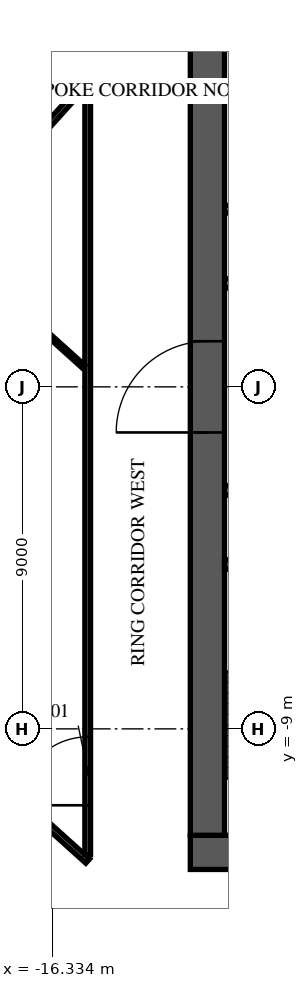
"""IFC4 building model, lengths in metres.
Left out: names, types, materials, properties, quantities, classifications, styles, units other than length and angle.
Written with IfcOpenShell. Run it as: python <this file> out.ifc"""

import sys

from ifc_helpers import new_model, si_unit, direction, frame, frame_2d, origin, place, context, subcontext, project, spatial, rectangle, extrude, element, fill, save


model = new_model("IFC4")
c1 = context("Model", 3, precision=1e-05, world=origin(), true_north=direction((0.0, 1.0)))
c2 = subcontext(c1, "Body", "Model", "MODEL_VIEW")
j1 = project(units=[si_unit("LENGTHUNIT", "METRE"), si_unit("PLANEANGLEUNIT", "RADIAN")], contexts=[c1])
p1 = place(None, origin())
s1 = spatial("IfcSite", under=j1, at=p1, CompositionType="ELEMENT")
p2 = place(p1, origin())
s2 = spatial("IfcBuilding", under=s1, at=p2, CompositionType="ELEMENT")
p3 = place(p2, frame((0.0, 0.0, 217.3)))
s3 = spatial("IfcBuildingStorey", under=s2, at=p3, CompositionType="ELEMENT", Elevation=217.3)
p4 = place(p3, frame((-12.7, -12.25, 0.0), z_axis=(0.0, 0.0, 1.0), x_axis=(1.0, 0.0, 0.0)))
e1 = element("IfcWall", 1, at=p4, inside=s3, PredefinedType="SHEAR", context=c2, shape_type="SweptSolid", body=[
    extrude(rectangle(XDim=25.4, YDim=0.9, at=frame_2d((12.7, 0.0))), origin(), (0.0, 0.0, 1.0), 3.62),
])
p5 = place(p4, frame((7.6, 0.0, 0.0)))
e2 = element("IfcOpeningElement", 2, at=p5, cuts=e1, PredefinedType="OPENING", context=c2, shape_type="SweptSolid", body=[
    extrude(rectangle(XDim=2.0, YDim=2.1, at=frame_2d((1.0, 1.05))), frame((0.0, 0.46, 0.0), z_axis=(0.0, -1.0, 0.0), x_axis=(1.0, 0.0, 0.0)), (0.0, 0.0, 1.0), 0.92),
])
p6 = place(p4, frame((17.725, 0.0, 0.0)))
e3 = element("IfcOpeningElement", 3, at=p6, cuts=e1, PredefinedType="OPENING", context=c2, shape_type="SweptSolid", body=[
    extrude(rectangle(XDim=1.2, YDim=2.1, at=frame_2d((0.6, 1.05))), frame((0.0, 0.46, 0.0), z_axis=(0.0, -1.0, 0.0), x_axis=(1.0, 0.0, 0.0)), (0.0, 0.0, 1.0), 0.92),
])
p7 = place(p4, frame((1.875, 0.0, 0.0)))
e4 = element("IfcOpeningElement", 4, at=p7, cuts=e1, PredefinedType="OPENING", context=c2, shape_type="SweptSolid", body=[
    extrude(rectangle(XDim=1.2, YDim=2.1, at=frame_2d((0.6, 1.05))), frame((0.0, 0.46, 0.0), z_axis=(0.0, -1.0, 0.0), x_axis=(1.0, 0.0, 0.0)), (0.0, 0.0, 1.0), 0.92),
])
p8 = place(p4, frame((22.325, 0.0, 0.0)))
e5 = element("IfcOpeningElement", 5, at=p8, cuts=e1, PredefinedType="OPENING", context=c2, shape_type="SweptSolid", body=[
    extrude(rectangle(XDim=1.2, YDim=2.1, at=frame_2d((0.6, 1.05))), frame((0.0, 0.46, 0.0), z_axis=(0.0, -1.0, 0.0), x_axis=(1.0, 0.0, 0.0)), (0.0, 0.0, 1.0), 0.92),
])
p9 = place(p3, frame((-12.25, -11.8, 0.0), z_axis=(0.0, 0.0, 1.0), x_axis=(0.0, 1.0, 0.0)))
e6 = element("IfcWall", 6, at=p9, inside=s3, PredefinedType="SHEAR", context=c2, shape_type="SweptSolid", body=[
    extrude(rectangle(XDim=23.6, YDim=0.9, at=frame_2d((11.8, 0.0))), origin(), (0.0, 0.0, 1.0), 3.62),
])
p10 = place(p9, frame((10.6, 0.0, 0.0)))
e7 = element("IfcOpeningElement", 7, at=p10, cuts=e6, PredefinedType="OPENING", context=c2, shape_type="SweptSolid", body=[
    extrude(rectangle(XDim=2.4, YDim=2.4, at=frame_2d((1.2, 1.2))), frame((0.0, 0.46, 0.0), z_axis=(0.0, -1.0, 0.0), x_axis=(1.0, 0.0, 0.0)), (0.0, 0.0, 1.0), 0.92),
])
p11 = place(p3, frame((-8.65, -4.675, 0.0), z_axis=(0.0, 0.0, 1.0), x_axis=(-1.0, 0.0, 0.0)))
e8 = element("IfcWall", 8, at=p11, inside=s3, PredefinedType="SOLIDWALL", context=c2, shape_type="SweptSolid", body=[
    extrude(rectangle(XDim=3.15, YDim=0.25, at=frame_2d((1.575, 0.0))), origin(), (0.0, 0.0, 1.0), 3.62),
])
p12 = place(p3, frame((-11.795, -2.725, 0.0), z_axis=(0.0, 0.0, 1.0), x_axis=(1.0, 0.0, 0.0)))
e9 = element("IfcWall", 9, at=p12, inside=s3, PredefinedType="PARTITIONING", context=c2, shape_type="SweptSolid", body=[
    extrude(rectangle(XDim=8.915, YDim=0.25, at=frame_2d((4.458, 0.0))), origin(), (0.0, 0.0, 1.0), 3.62),
])
p13 = place(p12, frame((1.295, 0.0, 0.0)))
e10 = element("IfcOpeningElement", 10, at=p13, cuts=e9, PredefinedType="OPENING", context=c2, shape_type="SweptSolid", body=[
    extrude(rectangle(XDim=1.0, YDim=2.1, at=frame_2d((0.5, 1.05))), frame((0.0, 0.135, 0.0), z_axis=(0.0, -1.0, 0.0), x_axis=(1.0, 0.0, 0.0)), (0.0, 0.0, 1.0), 0.27),
])
p14 = place(p12, frame((4.42, 0.0, 0.0)))
e11 = element("IfcOpeningElement", 11, at=p14, cuts=e9, PredefinedType="OPENING", context=c2, shape_type="SweptSolid", body=[
    extrude(rectangle(XDim=1.0, YDim=2.1, at=frame_2d((0.5, 1.05))), frame((0.0, 0.135, 0.0), z_axis=(0.0, -1.0, 0.0), x_axis=(1.0, 0.0, 0.0)), (0.0, 0.0, 1.0), 0.27),
])
p15 = place(p3, frame((-11.795, 2.725, 0.0), z_axis=(0.0, 0.0, 1.0), x_axis=(1.0, 0.0, 0.0)))
e12 = element("IfcWall", 12, at=p15, inside=s3, PredefinedType="PARTITIONING", context=c2, shape_type="SweptSolid", body=[
    extrude(rectangle(XDim=3.415, YDim=0.25, at=frame_2d((1.708, 0.0))), origin(), (0.0, 0.0, 1.0), 3.62),
])
p16 = place(p15, frame((1.345, 0.0, 0.0)))
e13 = element("IfcOpeningElement", 13, at=p16, cuts=e12, PredefinedType="OPENING", context=c2, shape_type="SweptSolid", body=[
    extrude(rectangle(XDim=0.9, YDim=2.1, at=frame_2d((0.45, 1.05))), frame((0.0, 0.135, 0.0), z_axis=(0.0, -1.0, 0.0), x_axis=(1.0, 0.0, 0.0)), (0.0, 0.0, 1.0), 0.27),
])
p17 = place(p3, frame((-11.795, 4.675, 0.0), z_axis=(0.0, 0.0, 1.0), x_axis=(1.0, 0.0, 0.0)))
e14 = element("IfcWall", 14, at=p17, inside=s3, PredefinedType="PARTITIONING", context=c2, shape_type="SweptSolid", body=[
    extrude(rectangle(XDim=3.415, YDim=0.2, at=frame_2d((1.708, 0.0))), origin(), (0.0, 0.0, 1.0), 3.62),
])
p18 = place(p3, frame((-1.962, 34.735, 0.0), z_axis=(0.0, 0.0, 1.0), x_axis=(-0.669133181838, -0.743142506497, 0.0)))
e15 = element("IfcWall", 15, at=p18, inside=s3, PredefinedType="STANDARD", context=c2, shape_type="SweptSolid", body=[
    extrude(rectangle(XDim=49.0, YDim=0.6, at=frame_2d((24.5, 0.0))), origin(), (0.0, 0.0, 1.0), 3.62),
])
p19 = place(p18, frame((1.227, 0.0, 0.9)))
e16 = element("IfcOpeningElement", 16, at=p19, cuts=e15, PredefinedType="OPENING", context=c2, shape_type="SweptSolid", body=[
    extrude(rectangle(XDim=2.0, YDim=2.1, at=frame_2d((1.0, 1.05))), frame((0.0, 0.31, 0.0), z_axis=(0.0, -1.0, 0.0), x_axis=(1.0, 0.0, 0.0)), (0.0, 0.0, 1.0), 0.62),
])
p20 = place(p18, frame((5.682, 0.0, 0.9)))
e17 = element("IfcOpeningElement", 17, at=p20, cuts=e15, PredefinedType="OPENING", context=c2, shape_type="SweptSolid", body=[
    extrude(rectangle(XDim=2.0, YDim=2.1, at=frame_2d((1.0, 1.05))), frame((0.0, 0.31, 0.0), z_axis=(0.0, -1.0, 0.0), x_axis=(1.0, 0.0, 0.0)), (0.0, 0.0, 1.0), 0.62),
])
p21 = place(p18, frame((10.136, 0.0, 0.9)))
e18 = element("IfcOpeningElement", 18, at=p21, cuts=e15, PredefinedType="OPENING", context=c2, shape_type="SweptSolid", body=[
    extrude(rectangle(XDim=2.0, YDim=2.1, at=frame_2d((1.0, 1.05))), frame((0.0, 0.31, 0.0), z_axis=(0.0, -1.0, 0.0), x_axis=(1.0, 0.0, 0.0)), (0.0, 0.0, 1.0), 0.62),
])
p22 = place(p18, frame((14.591, 0.0, 0.9)))
e19 = element("IfcOpeningElement", 19, at=p22, cuts=e15, PredefinedType="OPENING", context=c2, shape_type="SweptSolid", body=[
    extrude(rectangle(XDim=2.0, YDim=2.1, at=frame_2d((1.0, 1.05))), frame((0.0, 0.31, 0.0), z_axis=(0.0, -1.0, 0.0), x_axis=(1.0, 0.0, 0.0)), (0.0, 0.0, 1.0), 0.62),
])
p23 = place(p18, frame((19.045, 0.0, 0.9)))
e20 = element("IfcOpeningElement", 20, at=p23, cuts=e15, PredefinedType="OPENING", context=c2, shape_type="SweptSolid", body=[
    extrude(rectangle(XDim=2.0, YDim=2.1, at=frame_2d((1.0, 1.05))), frame((0.0, 0.31, 0.0), z_axis=(0.0, -1.0, 0.0), x_axis=(1.0, 0.0, 0.0)), (0.0, 0.0, 1.0), 0.62),
])
p24 = place(p18, frame((23.5, 0.0, 0.9)))
e21 = element("IfcOpeningElement", 21, at=p24, cuts=e15, PredefinedType="OPENING", context=c2, shape_type="SweptSolid", body=[
    extrude(rectangle(XDim=2.0, YDim=2.1, at=frame_2d((1.0, 1.05))), frame((0.0, 0.31, 0.0), z_axis=(0.0, -1.0, 0.0), x_axis=(1.0, 0.0, 0.0)), (0.0, 0.0, 1.0), 0.62),
])
p25 = place(p18, frame((27.955, 0.0, 0.9)))
e22 = element("IfcOpeningElement", 22, at=p25, cuts=e15, PredefinedType="OPENING", context=c2, shape_type="SweptSolid", body=[
    extrude(rectangle(XDim=2.0, YDim=2.1, at=frame_2d((1.0, 1.05))), frame((0.0, 0.31, 0.0), z_axis=(0.0, -1.0, 0.0), x_axis=(1.0, 0.0, 0.0)), (0.0, 0.0, 1.0), 0.62),
])
p26 = place(p18, frame((32.409, 0.0, 0.9)))
e23 = element("IfcOpeningElement", 23, at=p26, cuts=e15, PredefinedType="OPENING", context=c2, shape_type="SweptSolid", body=[
    extrude(rectangle(XDim=2.0, YDim=2.1, at=frame_2d((1.0, 1.05))), frame((0.0, 0.31, 0.0), z_axis=(0.0, -1.0, 0.0), x_axis=(1.0, 0.0, 0.0)), (0.0, 0.0, 1.0), 0.62),
])
p27 = place(p18, frame((36.864, 0.0, 0.9)))
e24 = element("IfcOpeningElement", 24, at=p27, cuts=e15, PredefinedType="OPENING", context=c2, shape_type="SweptSolid", body=[
    extrude(rectangle(XDim=2.0, YDim=2.1, at=frame_2d((1.0, 1.05))), frame((0.0, 0.31, 0.0), z_axis=(0.0, -1.0, 0.0), x_axis=(1.0, 0.0, 0.0)), (0.0, 0.0, 1.0), 0.62),
])
p28 = place(p18, frame((41.318, 0.0, 0.9)))
e25 = element("IfcOpeningElement", 25, at=p28, cuts=e15, PredefinedType="OPENING", context=c2, shape_type="SweptSolid", body=[
    extrude(rectangle(XDim=2.0, YDim=2.1, at=frame_2d((1.0, 1.05))), frame((0.0, 0.31, 0.0), z_axis=(0.0, -1.0, 0.0), x_axis=(1.0, 0.0, 0.0)), (0.0, 0.0, 1.0), 0.62),
])
p29 = place(p18, frame((45.773, 0.0, 0.9)))
e26 = element("IfcOpeningElement", 26, at=p29, cuts=e15, PredefinedType="OPENING", context=c2, shape_type="SweptSolid", body=[
    extrude(rectangle(XDim=2.0, YDim=2.1, at=frame_2d((1.0, 1.05))), frame((0.0, 0.31, 0.0), z_axis=(0.0, -1.0, 0.0), x_axis=(1.0, 0.0, 0.0)), (0.0, 0.0, 1.0), 0.62),
])
p30 = place(p3, frame((-34.365, -9.023, 0.0), z_axis=(0.0, 0.0, 1.0), x_axis=(0.743146896498, -0.66912830625, 0.0)))
e27 = element("IfcWall", 27, at=p30, inside=s3, PredefinedType="STANDARD", context=c2, shape_type="SweptSolid", body=[
    extrude(rectangle(XDim=39.0, YDim=0.6, at=frame_2d((19.5, 0.0))), origin(), (0.0, 0.0, 1.0), 3.62),
])
p31 = place(p30, frame((1.217, 0.0, 0.9)))
e28 = element("IfcOpeningElement", 28, at=p31, cuts=e27, PredefinedType="OPENING", context=c2, shape_type="SweptSolid", body=[
    extrude(rectangle(XDim=1.9, YDim=2.1, at=frame_2d((0.95, 1.05))), frame((0.0, 0.31, 0.0), z_axis=(0.0, -1.0, 0.0), x_axis=(1.0, 0.0, 0.0)), (0.0, 0.0, 1.0), 0.62),
])
p32 = place(p30, frame((5.55, 0.0, 0.9)))
e29 = element("IfcOpeningElement", 29, at=p32, cuts=e27, PredefinedType="OPENING", context=c2, shape_type="SweptSolid", body=[
    extrude(rectangle(XDim=1.9, YDim=2.1, at=frame_2d((0.95, 1.05))), frame((0.0, 0.31, 0.0), z_axis=(0.0, -1.0, 0.0), x_axis=(1.0, 0.0, 0.0)), (0.0, 0.0, 1.0), 0.62),
])
p33 = place(p30, frame((9.883, 0.0, 0.9)))
e30 = element("IfcOpeningElement", 30, at=p33, cuts=e27, PredefinedType="OPENING", context=c2, shape_type="SweptSolid", body=[
    extrude(rectangle(XDim=1.9, YDim=2.1, at=frame_2d((0.95, 1.05))), frame((0.0, 0.31, 0.0), z_axis=(0.0, -1.0, 0.0), x_axis=(1.0, 0.0, 0.0)), (0.0, 0.0, 1.0), 0.62),
])
p34 = place(p30, frame((14.217, 0.0, 0.9)))
e31 = element("IfcOpeningElement", 31, at=p34, cuts=e27, PredefinedType="OPENING", context=c2, shape_type="SweptSolid", body=[
    extrude(rectangle(XDim=1.9, YDim=2.1, at=frame_2d((0.95, 1.05))), frame((0.0, 0.31, 0.0), z_axis=(0.0, -1.0, 0.0), x_axis=(1.0, 0.0, 0.0)), (0.0, 0.0, 1.0), 0.62),
])
p35 = place(p30, frame((18.55, 0.0, 0.9)))
e32 = element("IfcOpeningElement", 32, at=p35, cuts=e27, PredefinedType="OPENING", context=c2, shape_type="SweptSolid", body=[
    extrude(rectangle(XDim=1.9, YDim=2.1, at=frame_2d((0.95, 1.05))), frame((0.0, 0.31, 0.0), z_axis=(0.0, -1.0, 0.0), x_axis=(1.0, 0.0, 0.0)), (0.0, 0.0, 1.0), 0.62),
])
p36 = place(p30, frame((22.883, 0.0, 0.9)))
e33 = element("IfcOpeningElement", 33, at=p36, cuts=e27, PredefinedType="OPENING", context=c2, shape_type="SweptSolid", body=[
    extrude(rectangle(XDim=1.9, YDim=2.1, at=frame_2d((0.95, 1.05))), frame((0.0, 0.31, 0.0), z_axis=(0.0, -1.0, 0.0), x_axis=(1.0, 0.0, 0.0)), (0.0, 0.0, 1.0), 0.62),
])
p37 = place(p30, frame((27.217, 0.0, 0.9)))
e34 = element("IfcOpeningElement", 34, at=p37, cuts=e27, PredefinedType="OPENING", context=c2, shape_type="SweptSolid", body=[
    extrude(rectangle(XDim=1.9, YDim=2.1, at=frame_2d((0.95, 1.05))), frame((0.0, 0.31, 0.0), z_axis=(0.0, -1.0, 0.0), x_axis=(1.0, 0.0, 0.0)), (0.0, 0.0, 1.0), 0.62),
])
p38 = place(p30, frame((31.55, 0.0, 0.9)))
e35 = element("IfcOpeningElement", 35, at=p38, cuts=e27, PredefinedType="OPENING", context=c2, shape_type="SweptSolid", body=[
    extrude(rectangle(XDim=1.9, YDim=2.1, at=frame_2d((0.95, 1.05))), frame((0.0, 0.31, 0.0), z_axis=(0.0, -1.0, 0.0), x_axis=(1.0, 0.0, 0.0)), (0.0, 0.0, 1.0), 0.62),
])
p39 = place(p30, frame((35.883, 0.0, 0.9)))
e36 = element("IfcOpeningElement", 36, at=p39, cuts=e27, PredefinedType="OPENING", context=c2, shape_type="SweptSolid", body=[
    extrude(rectangle(XDim=1.9, YDim=2.1, at=frame_2d((0.95, 1.05))), frame((0.0, 0.31, 0.0), z_axis=(0.0, -1.0, 0.0), x_axis=(1.0, 0.0, 0.0)), (0.0, 0.0, 1.0), 0.62),
])
p40 = place(p3, frame((-24.952, 1.024, 0.0), z_axis=(0.0, 0.0, 1.0), x_axis=(0.66912723064, 0.743147864974, 0.0)))
e37 = element("IfcWall", 37, at=p40, inside=s3, PredefinedType="PARTITIONING", context=c2, shape_type="SweptSolid", body=[
    extrude(rectangle(XDim=31.871, YDim=0.15, at=frame_2d((15.936, 0.0))), origin(), (0.0, 0.0, 1.0), 3.17),
])
p41 = place(p40, frame((16.202, 0.0, 0.0)))
e38 = element("IfcOpeningElement", 38, at=p41, cuts=e37, PredefinedType="OPENING", context=c2, shape_type="SweptSolid", body=[
    extrude(rectangle(XDim=1.0, YDim=2.1, at=frame_2d((0.5, 1.05))), frame((0.0, 0.085, 0.0), z_axis=(0.0, -1.0, 0.0), x_axis=(1.0, 0.0, 0.0)), (0.0, 0.0, 1.0), 0.17),
])
p42 = place(p40, frame((28.08, 0.0, 0.0)))
e39 = element("IfcOpeningElement", 39, at=p42, cuts=e37, PredefinedType="OPENING", context=c2, shape_type="SweptSolid", body=[
    extrude(rectangle(XDim=1.8, YDim=2.1, at=frame_2d((0.9, 1.05))), frame((0.0, 0.085, 0.0), z_axis=(0.0, -1.0, 0.0), x_axis=(1.0, 0.0, 0.0)), (0.0, 0.0, 1.0), 0.17),
])
p43 = place(p40, frame((22.58, 0.0, 0.0)))
e40 = element("IfcOpeningElement", 40, at=p43, cuts=e37, PredefinedType="OPENING", context=c2, shape_type="SweptSolid", body=[
    extrude(rectangle(XDim=1.0, YDim=2.1, at=frame_2d((0.5, 1.05))), frame((0.0, 0.085, 0.0), z_axis=(0.0, -1.0, 0.0), x_axis=(1.0, 0.0, 0.0)), (0.0, 0.0, 1.0), 0.17),
])
p44 = place(p3, frame((-24.285, -7.708, 0.0), z_axis=(0.0, 0.0, 1.0), x_axis=(0.743144813636, -0.66913061951, 0.0)))
e41 = element("IfcWall", 41, at=p44, inside=s3, PredefinedType="PARTITIONING", context=c2, shape_type="SweptSolid", body=[
    extrude(rectangle(XDim=25.854, YDim=0.15, at=frame_2d((12.927, 0.0))), origin(), (0.0, 0.0, 1.0), 3.17),
])
p45 = place(p44, frame((9.29, 0.0, 0.0)))
e42 = element("IfcOpeningElement", 42, at=p45, cuts=e41, PredefinedType="OPENING", context=c2, shape_type="SweptSolid", body=[
    extrude(rectangle(XDim=1.0, YDim=2.1, at=frame_2d((0.5, 1.05))), frame((0.0, 0.085, 0.0), z_axis=(0.0, -1.0, 0.0), x_axis=(1.0, 0.0, 0.0)), (0.0, 0.0, 1.0), 0.17),
])
p46 = place(p3, frame((-23.119, -0.526, 0.0), z_axis=(0.0, 0.0, 1.0), x_axis=(0.669146693107, 0.743130340589, 0.0)))
e43 = element("IfcWall", 43, at=p46, inside=s3, PredefinedType="PARTITIONING", context=c2, shape_type="SweptSolid", body=[
    extrude(rectangle(XDim=11.415, YDim=0.15, at=frame_2d((5.707, 0.0))), origin(), (0.0, 0.0, 1.0), 3.17),
])
p47 = place(p46, frame((7.178, 0.0, 0.0)))
e44 = element("IfcOpeningElement", 44, at=p47, cuts=e43, PredefinedType="OPENING", context=c2, shape_type="SweptSolid", body=[
    extrude(rectangle(XDim=1.0, YDim=2.1, at=frame_2d((0.5, 1.05))), frame((0.0, 0.085, 0.0), z_axis=(0.0, -1.0, 0.0), x_axis=(1.0, 0.0, 0.0)), (0.0, 0.0, 1.0), 0.17),
])
p48 = place(p3, frame((-22.679, -5.925, 0.0), z_axis=(0.0, 0.0, 1.0), x_axis=(0.743175153667, -0.669096921956, 0.0)))
e45 = element("IfcWall", 45, at=p48, inside=s3, PredefinedType="PARTITIONING", context=c2, shape_type="SweptSolid", body=[
    extrude(rectangle(XDim=9.795, YDim=0.15, at=frame_2d((4.897, 0.0))), origin(), (0.0, 0.0, 1.0), 3.17),
])
p49 = place(p48, frame((3.55, 0.0, 0.0)))
e46 = element("IfcOpeningElement", 46, at=p49, cuts=e45, PredefinedType="OPENING", context=c2, shape_type="SweptSolid", body=[
    extrude(rectangle(XDim=1.0, YDim=2.1, at=frame_2d((0.5, 1.05))), frame((0.0, 0.085, 0.0), z_axis=(0.0, -1.0, 0.0), x_axis=(1.0, 0.0, 0.0)), (0.0, 0.0, 1.0), 0.17),
])
p50 = place(p3, frame((-15.4, -12.311, 0.0), z_axis=(0.0, 0.0, 1.0), x_axis=(0.0, 1.0, 0.0)))
e47 = element("IfcWall", 47, at=p50, inside=s3, PredefinedType="PARTITIONING", context=c2, shape_type="SweptSolid", body=[
    extrude(rectangle(XDim=20.194, YDim=0.15, at=frame_2d((10.097, 0.0))), origin(), (0.0, 0.0, 1.0), 3.17),
])
p51 = place(p50, frame((1.3, 0.0, 0.0)))
e48 = element("IfcOpeningElement", 48, at=p51, cuts=e47, PredefinedType="OPENING", context=c2, shape_type="SweptSolid", body=[
    extrude(rectangle(XDim=1.8, YDim=2.1, at=frame_2d((0.9, 1.05))), frame((0.0, 0.085, 0.0), z_axis=(0.0, -1.0, 0.0), x_axis=(1.0, 0.0, 0.0)), (0.0, 0.0, 1.0), 0.17),
])
p52 = place(p3, frame((-19.129, 3.792, 0.0), z_axis=(0.0, 0.0, 1.0), x_axis=(0.74316706076, -0.66910591075, 0.0)))
e49 = element("IfcWall", 49, at=p52, inside=s3, PredefinedType="PARTITIONING", context=c2, shape_type="SweptSolid", body=[
    extrude(rectangle(XDim=4.872, YDim=0.1, at=frame_2d((2.436, 0.0))), origin(), (0.0, 0.0, 1.0), 3.17),
])
p53 = place(p10, origin())
e50 = element("IfcDoor", 50, at=p53, inside=s3, OperationType="SINGLE_SWING_LEFT", PredefinedType="DOOR", context=c2, shape_type="SweptSolid", body=[
    extrude(rectangle(XDim=2.4, YDim=2.4, at=frame_2d((1.2, 1.2))), frame((0.0, 0.025, 0.0), z_axis=(0.0, -1.0, 0.0), x_axis=(1.0, 0.0, 0.0)), (0.0, 0.0, 1.0), 0.05),
])
fill(e7, e50)
p54 = place(p51, origin())
e51 = element("IfcDoor", 51, at=p54, inside=s3, OperationType="DOUBLE_DOOR_SINGLE_SWING", PredefinedType="DOOR", context=c2, shape_type="SweptSolid", body=[
    extrude(rectangle(XDim=1.8, YDim=2.1, at=frame_2d((0.9, 1.05))), frame((0.0, 0.025, 0.0), z_axis=(0.0, -1.0, 0.0), x_axis=(1.0, 0.0, 0.0)), (0.0, 0.0, 1.0), 0.05),
])
fill(e48, e51)
save(model, sys.argv[1])
